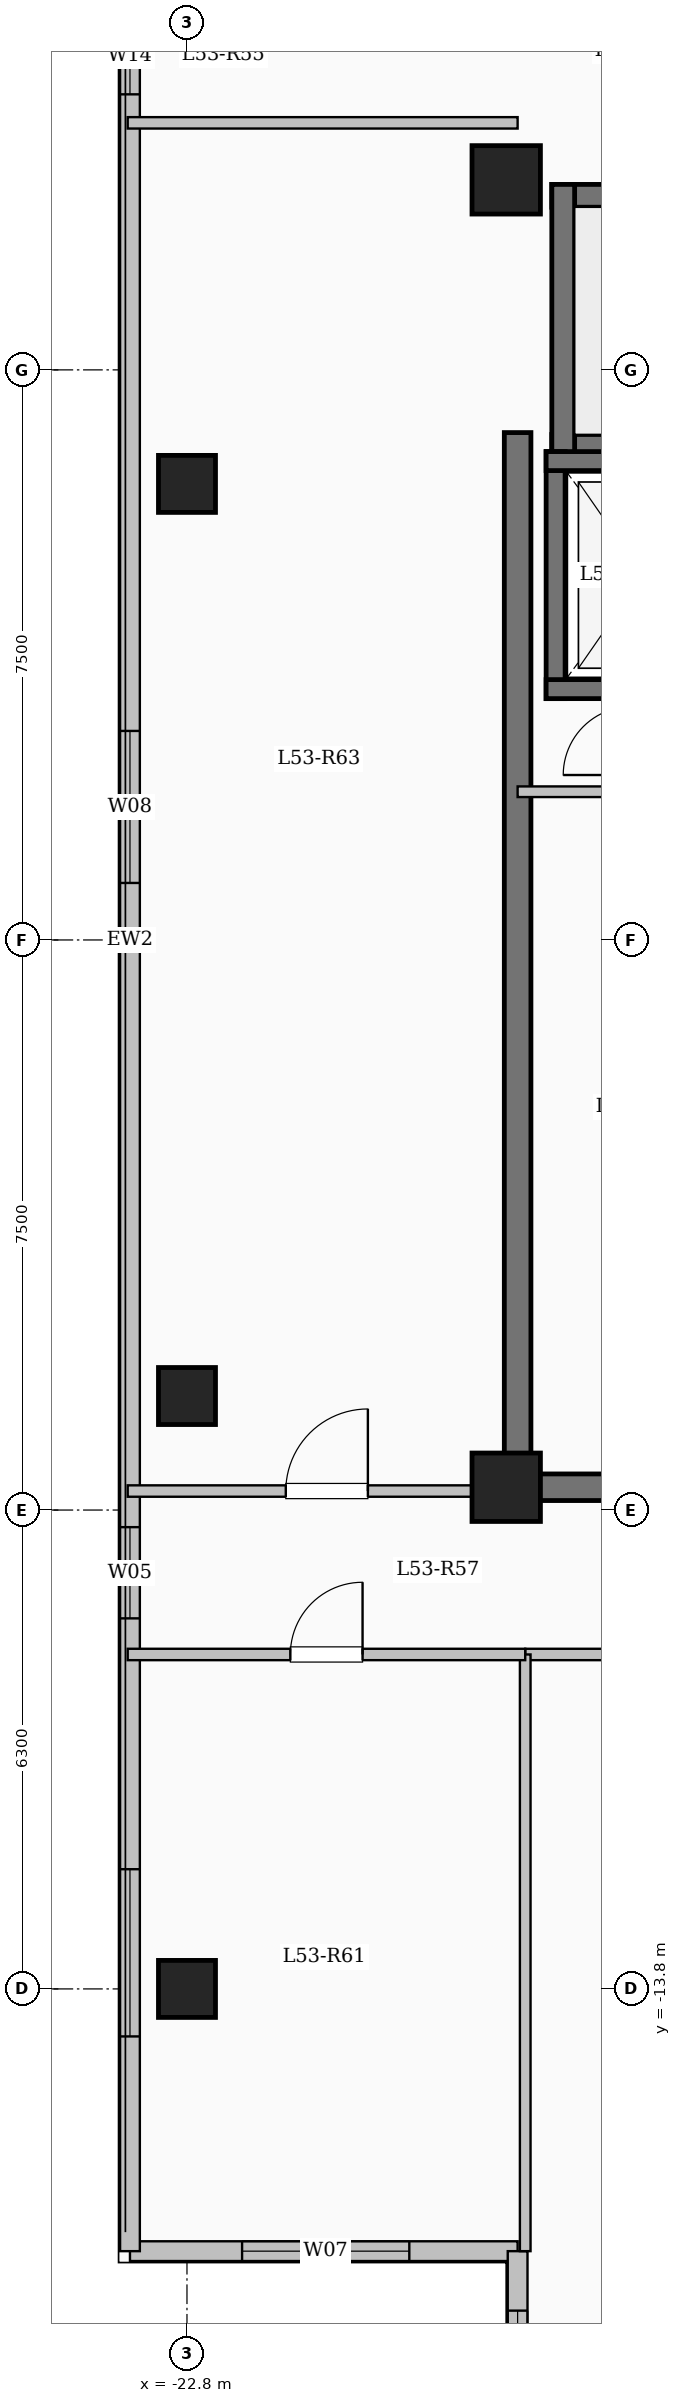
"""IFC4 building model, lengths in metres.
Left out: names, types, materials, properties, quantities, classifications, styles, units other than length and angle.
Written with IfcOpenShell. Run it as: python <this file> out.ifc"""

import sys

from ifc_helpers import new_model, si_unit, direction, frame, frame_2d, origin, origin_2d, place, context, subcontext, project, spatial, rectangle, extrude, element, fill, save


model = new_model("IFC4")
c1 = context("Model", 3, precision=1e-05, world=origin(), true_north=direction((0.0, 1.0)))
c2 = subcontext(c1, "Body", "Model", "MODEL_VIEW")
j1 = project(units=[si_unit("LENGTHUNIT", "METRE"), si_unit("PLANEANGLEUNIT", "RADIAN")], contexts=[c1])
p1 = place(None, origin())
s1 = spatial("IfcSite", under=j1, at=p1, CompositionType="ELEMENT")
p2 = place(p1, origin())
s2 = spatial("IfcBuilding", under=s1, at=p2, CompositionType="ELEMENT")
p3 = place(p2, frame((0.0, 0.0, 196.95)))
s3 = spatial("IfcBuildingStorey", under=s2, at=p3, CompositionType="ELEMENT", Elevation=196.95)
for number, where, z_axis, x_axis in (
    (1, (-18.6, -7.2, 0.0), (0.0, 0.0, 1.0), (1.0, 0.0, 0.0)),
    (2, (-18.6, 10.0, 0.0), (0.0, 0.0, 1.0), (1.0, 0.0, 0.0)),
):
    element("IfcColumn", number, at=place(p3, frame(where, z_axis=z_axis, x_axis=x_axis)), inside=s3, PredefinedType="COLUMN", context=c2, shape_type="SweptSolid", body=[
        extrude(rectangle(XDim=0.9, YDim=0.9, at=origin_2d()), origin(), (0.0, 0.0, 1.0), 3.35),
    ])
for number, where, z_axis, x_axis in (
    (3, (-22.8, -13.8, 0.0), (0.0, 0.0, 1.0), (1.0, 0.0, 0.0)),
    (4, (-22.8, -6.0, 0.0), (0.0, 0.0, 1.0), (1.0, 0.0, 0.0)),
    (5, (-22.8, 6.0, 0.0), (0.0, 0.0, 1.0), (1.0, 0.0, 0.0)),
):
    element("IfcColumn", number, at=place(p3, frame(where, z_axis=z_axis, x_axis=x_axis)), inside=s3, PredefinedType="COLUMN", context=c2, shape_type="SweptSolid", body=[
        extrude(rectangle(XDim=0.75, YDim=0.75, at=origin_2d()), origin(), (0.0, 0.0, 1.0), 3.35),
    ])
p4 = place(p3, frame((-18.45, -17.25, 0.0), z_axis=(0.0, 0.0, 1.0), x_axis=(-1.0, 0.0, 0.0)))
e6 = element("IfcWall", 6, at=p4, inside=s3, PredefinedType="SOLIDWALL", context=c2, shape_type="SweptSolid", body=[
    extrude(rectangle(XDim=5.1, YDim=0.26, at=frame_2d((2.55, 0.0))), origin(), (0.0, 0.0, 1.0), 3.1),
])
p5 = place(p4, frame((1.425, 0.0, 0.9)))
e7 = element("IfcOpeningElement", 7, at=p5, cuts=e6, PredefinedType="OPENING", context=c2, shape_type="SweptSolid", body=[
    extrude(rectangle(XDim=2.2, YDim=1.75, at=frame_2d((1.1, 0.875))), frame((0.0, 0.14, 0.0), z_axis=(0.0, -1.0, 0.0), x_axis=(1.0, 0.0, 0.0)), (0.0, 0.0, 1.0), 0.28),
])
p6 = place(p3, frame((-23.55, -17.25, 0.0), z_axis=(0.0, 0.0, 1.0), x_axis=(0.0, 1.0, 0.0)))
e8 = element("IfcWall", 8, at=p6, inside=s3, PredefinedType="SOLIDWALL", context=c2, shape_type="SweptSolid", body=[
    extrude(rectangle(XDim=34.5, YDim=0.26, at=frame_2d((17.25, 0.0))), origin(), (0.0, 0.0, 1.0), 3.1),
])
p7 = place(p6, frame((2.825, 0.0, 0.9)))
e9 = element("IfcOpeningElement", 9, at=p7, cuts=e8, PredefinedType="OPENING", context=c2, shape_type="SweptSolid", body=[
    extrude(rectangle(XDim=2.2, YDim=1.75, at=frame_2d((1.1, 0.875))), frame((0.0, 0.14, 0.0), z_axis=(0.0, -1.0, 0.0), x_axis=(1.0, 0.0, 0.0)), (0.0, 0.0, 1.0), 0.28),
])
p8 = place(p6, frame((8.325, 0.0, 0.95)))
e10 = element("IfcOpeningElement", 10, at=p8, cuts=e8, PredefinedType="OPENING", context=c2, shape_type="SweptSolid", body=[
    extrude(rectangle(XDim=1.2, YDim=1.5, at=frame_2d((0.6, 0.75))), frame((0.0, 0.14, 0.0), z_axis=(0.0, -1.0, 0.0), x_axis=(1.0, 0.0, 0.0)), (0.0, 0.0, 1.0), 0.28),
])
p9 = place(p6, frame((18.0, 0.0, 0.9)))
e11 = element("IfcOpeningElement", 11, at=p9, cuts=e8, PredefinedType="OPENING", context=c2, shape_type="SweptSolid", body=[
    extrude(rectangle(XDim=2.0, YDim=1.7, at=frame_2d((1.0, 0.85))), frame((0.0, 0.14, 0.0), z_axis=(0.0, -1.0, 0.0), x_axis=(1.0, 0.0, 0.0)), (0.0, 0.0, 1.0), 0.28),
])
p10 = place(p6, frame((28.375, 0.0, 0.95)))
e12 = element("IfcOpeningElement", 12, at=p10, cuts=e8, PredefinedType="OPENING", context=c2, shape_type="SweptSolid", body=[
    extrude(rectangle(XDim=1.0, YDim=1.5, at=frame_2d((0.5, 0.75))), frame((0.0, 0.14, 0.0), z_axis=(0.0, -1.0, 0.0), x_axis=(1.0, 0.0, 0.0)), (0.0, 0.0, 1.0), 0.28),
])
p11 = place(p6, frame((31.125, 0.0, 0.9)))
e13 = element("IfcOpeningElement", 13, at=p11, cuts=e8, PredefinedType="OPENING", context=c2, shape_type="SweptSolid", body=[
    extrude(rectangle(XDim=2.0, YDim=1.7, at=frame_2d((1.0, 0.85))), frame((0.0, 0.14, 0.0), z_axis=(0.0, -1.0, 0.0), x_axis=(1.0, 0.0, 0.0)), (0.0, 0.0, 1.0), 0.28),
])
p12 = place(p3, frame((-18.45, -20.85, 0.0), z_axis=(0.0, 0.0, 1.0), x_axis=(0.0, 1.0, 0.0)))
e14 = element("IfcWall", 14, at=p12, inside=s3, PredefinedType="SOLIDWALL", context=c2, shape_type="SweptSolid", body=[
    extrude(rectangle(XDim=3.6, YDim=0.26, at=frame_2d((1.8, 0.0))), origin(), (0.0, 0.0, 1.0), 3.1),
])
p13 = place(p12, frame((0.817, 0.0, 0.9)))
e15 = element("IfcOpeningElement", 15, at=p13, cuts=e14, PredefinedType="OPENING", context=c2, shape_type="SweptSolid", body=[
    extrude(rectangle(XDim=2.0, YDim=1.7, at=frame_2d((1.0, 0.85))), frame((0.0, 0.14, 0.0), z_axis=(0.0, -1.0, 0.0), x_axis=(1.0, 0.0, 0.0)), (0.0, 0.0, 1.0), 0.28),
])
p14 = place(p3, frame((-18.0, 9.79, 0.0), z_axis=(0.0, 0.0, 1.0), x_axis=(1.0, 0.0, 0.0)))
e16 = element("IfcWall", 16, at=p14, inside=s3, PredefinedType="SHEAR", context=c2, shape_type="SweptSolid", body=[
    extrude(rectangle(XDim=8.0, YDim=0.3, at=frame_2d((4.0, 0.0))), origin(), (0.0, 0.0, 1.0), 3.35),
])
p15 = place(p3, frame((-18.0, 6.5, 0.0), z_axis=(0.0, 0.0, 1.0), x_axis=(1.0, 0.0, 0.0)))
e17 = element("IfcWall", 17, at=p15, inside=s3, PredefinedType="SHEAR", context=c2, shape_type="SweptSolid", body=[
    extrude(rectangle(XDim=8.0, YDim=0.3, at=frame_2d((4.0, 0.0))), origin(), (0.0, 0.0, 1.0), 3.35),
])
p16 = place(p15, frame((6.45, 0.0, 0.0)))
e18 = element("IfcOpeningElement", 18, at=p16, cuts=e17, PredefinedType="OPENING", context=c2, shape_type="SweptSolid", body=[
    extrude(rectangle(XDim=1.0, YDim=2.15, at=frame_2d((0.5, 1.075))), frame((0.0, 0.16, 0.0), z_axis=(0.0, -1.0, 0.0), x_axis=(1.0, 0.0, 0.0)), (0.0, 0.0, 1.0), 0.32),
])
p17 = place(p3, frame((-17.85, 6.35, 0.0), z_axis=(0.0, 0.0, 1.0), x_axis=(0.0, 1.0, 0.0)))
e19 = element("IfcWall", 19, at=p17, inside=s3, PredefinedType="SHEAR", context=c2, shape_type="SweptSolid", body=[
    extrude(rectangle(XDim=3.59, YDim=0.3, at=frame_2d((1.795, 0.0))), origin(), (0.0, 0.0, 1.0), 3.35),
])
p18 = place(p3, frame((-17.95, 3.175, 0.0), z_axis=(0.0, 0.0, 1.0), x_axis=(0.0, 1.0, 0.0)))
e20 = element("IfcWall", 20, at=p18, inside=s3, PredefinedType="SHEAR", context=c2, shape_type="SweptSolid", body=[
    extrude(rectangle(XDim=3.25, YDim=0.25, at=frame_2d((1.625, 0.0))), origin(), (0.0, 0.0, 1.0), 3.35),
])
for number, where, z_axis, x_axis in (
    (21, (-18.075, 3.3, 0.0), (0.0, 0.0, 1.0), (1.0, 0.0, 0.0)),
    (22, (-18.075, 6.3, 0.0), (0.0, 0.0, 1.0), (1.0, 0.0, 0.0)),
):
    element("IfcWall", number, at=place(p3, frame(where, z_axis=z_axis, x_axis=x_axis)), inside=s3, PredefinedType="SHEAR", context=c2, shape_type="SweptSolid", body=[
        extrude(rectangle(XDim=2.55, YDim=0.25, at=frame_2d((1.275, 0.0))), origin(), (0.0, 0.0, 1.0), 3.35),
    ])
p19 = place(p3, frame((-18.45, -7.375, 0.0), z_axis=(0.0, 0.0, 1.0), x_axis=(0.0, 1.0, 0.0)))
e23 = element("IfcWall", 23, at=p19, inside=s3, PredefinedType="SHEAR", context=c2, shape_type="SweptSolid", body=[
    extrude(rectangle(XDim=14.05, YDim=0.35, at=frame_2d((7.025, 0.0))), origin(), (0.0, 0.0, 1.0), 3.35),
])
p20 = place(p3, frame((-18.625, -7.2, 0.0), z_axis=(0.0, 0.0, 1.0), x_axis=(1.0, 0.0, 0.0)))
e24 = element("IfcWall", 24, at=p20, inside=s3, PredefinedType="SHEAR", context=c2, shape_type="SweptSolid", body=[
    extrude(rectangle(XDim=8.55, YDim=0.35, at=frame_2d((4.275, 0.0))), origin(), (0.0, 0.0, 1.0), 3.35),
])
p21 = place(p20, frame((1.725, 0.0, 0.0)))
e25 = element("IfcOpeningElement", 25, at=p21, cuts=e24, PredefinedType="OPENING", context=c2, shape_type="SweptSolid", body=[
    extrude(rectangle(XDim=1.12, YDim=2.15, at=frame_2d((0.56, 1.075))), frame((0.0, 0.185, 0.0), z_axis=(0.0, -1.0, 0.0), x_axis=(1.0, 0.0, 0.0)), (0.0, 0.0, 1.0), 0.37),
])
p22 = place(p3, frame((-18.45, 1.95, 0.0), z_axis=(0.0, 0.0, 1.0), x_axis=(1.0, 0.0, 0.0)))
e26 = element("IfcWall", 26, at=p22, inside=s3, PredefinedType="PARTITIONING", context=c2, shape_type="SweptSolid", body=[
    extrude(rectangle(XDim=3.15, YDim=0.14, at=frame_2d((1.575, 0.0))), origin(), (0.0, 0.0, 1.0), 3.1),
])
p23 = place(p22, frame((1.9, 0.0, 0.0)))
e27 = element("IfcOpeningElement", 27, at=p23, cuts=e26, PredefinedType="OPENING", context=c2, shape_type="SweptSolid", body=[
    extrude(rectangle(XDim=0.9, YDim=2.08, at=frame_2d((0.45, 1.04))), frame((0.0, 0.08, 0.0), z_axis=(0.0, -1.0, 0.0), x_axis=(1.0, 0.0, 0.0)), (0.0, 0.0, 1.0), 0.16),
])
p24 = place(p3, frame((-18.35, -9.4, 0.0), z_axis=(0.0, 0.0, 1.0), x_axis=(1.0, 0.0, 0.0)))
e28 = element("IfcWall", 28, at=p24, inside=s3, PredefinedType="PARTITIONING", context=c2, shape_type="SweptSolid", body=[
    extrude(rectangle(XDim=9.8, YDim=0.15, at=frame_2d((4.9, 0.0))), origin(), (0.0, 0.0, 1.0), 3.1),
])
p25 = place(p24, frame((1.25, 0.0, 0.0)))
e29 = element("IfcOpeningElement", 29, at=p25, cuts=e28, PredefinedType="OPENING", context=c2, shape_type="SweptSolid", body=[
    extrude(rectangle(XDim=0.95, YDim=2.15, at=frame_2d((0.475, 1.075))), frame((0.0, 0.085, 0.0), z_axis=(0.0, -1.0, 0.0), x_axis=(1.0, 0.0, 0.0)), (0.0, 0.0, 1.0), 0.17),
])
p26 = place(p24, frame((4.79, 0.0, 0.0)))
e30 = element("IfcOpeningElement", 30, at=p26, cuts=e28, PredefinedType="OPENING", context=c2, shape_type="SweptSolid", body=[
    extrude(rectangle(XDim=0.95, YDim=2.15, at=frame_2d((0.475, 1.075))), frame((0.0, 0.085, 0.0), z_axis=(0.0, -1.0, 0.0), x_axis=(1.0, 0.0, 0.0)), (0.0, 0.0, 1.0), 0.17),
])
p27 = place(p24, frame((7.94, 0.0, 0.0)))
e31 = element("IfcOpeningElement", 31, at=p27, cuts=e28, PredefinedType="OPENING", context=c2, shape_type="SweptSolid", body=[
    extrude(rectangle(XDim=0.95, YDim=2.15, at=frame_2d((0.475, 1.075))), frame((0.0, 0.085, 0.0), z_axis=(0.0, -1.0, 0.0), x_axis=(1.0, 0.0, 0.0)), (0.0, 0.0, 1.0), 0.17),
])
p28 = place(p3, frame((-23.58, -7.25, 0.0), z_axis=(0.0, 0.0, 1.0), x_axis=(1.0, 0.0, 0.0)))
e32 = element("IfcWall", 32, at=p28, inside=s3, PredefinedType="PARTITIONING", context=c2, shape_type="SweptSolid", body=[
    extrude(rectangle(XDim=5.13, YDim=0.15, at=frame_2d((2.565, 0.0))), origin(), (0.0, 0.0, 1.0), 3.1),
])
p29 = place(p28, frame((2.08, 0.0, 0.0)))
e33 = element("IfcOpeningElement", 33, at=p29, cuts=e32, PredefinedType="OPENING", context=c2, shape_type="SweptSolid", body=[
    extrude(rectangle(XDim=1.08, YDim=2.15, at=frame_2d((0.54, 1.075))), frame((0.0, 0.085, 0.0), z_axis=(0.0, -1.0, 0.0), x_axis=(1.0, 0.0, 0.0)), (0.0, 0.0, 1.0), 0.17),
])
p30 = place(p3, frame((-23.58, 10.75, 0.0), z_axis=(0.0, 0.0, 1.0), x_axis=(1.0, 0.0, 0.0)))
e34 = element("IfcWall", 34, at=p30, inside=s3, PredefinedType="PARTITIONING", context=c2, shape_type="SweptSolid", body=[
    extrude(rectangle(XDim=5.13, YDim=0.15, at=frame_2d((2.565, 0.0))), origin(), (0.0, 0.0, 1.0), 3.1),
])
p31 = place(p3, frame((-18.35, -17.25, 0.0), z_axis=(0.0, 0.0, 1.0), x_axis=(0.0, 1.0, 0.0)))
e35 = element("IfcWall", 35, at=p31, inside=s3, PredefinedType="PARTITIONING", context=c2, shape_type="SweptSolid", body=[
    extrude(rectangle(XDim=7.85, YDim=0.14, at=frame_2d((3.925, 0.0))), origin(), (0.0, 0.0, 1.0), 3.1),
])
p32 = place(p3, frame((-23.58, -9.4, 0.0), z_axis=(0.0, 0.0, 1.0), x_axis=(1.0, 0.0, 0.0)))
e36 = element("IfcWall", 36, at=p32, inside=s3, PredefinedType="PARTITIONING", context=c2, shape_type="SweptSolid", body=[
    extrude(rectangle(XDim=5.23, YDim=0.15, at=frame_2d((2.615, 0.0))), origin(), (0.0, 0.0, 1.0), 3.1),
])
p33 = place(p32, frame((2.14, 0.0, 0.0)))
e37 = element("IfcOpeningElement", 37, at=p33, cuts=e36, PredefinedType="OPENING", context=c2, shape_type="SweptSolid", body=[
    extrude(rectangle(XDim=0.95, YDim=2.15, at=frame_2d((0.475, 1.075))), frame((0.0, 0.085, 0.0), z_axis=(0.0, -1.0, 0.0), x_axis=(1.0, 0.0, 0.0)), (0.0, 0.0, 1.0), 0.17),
])
p34 = place(p5, origin())
e38 = element("IfcWindow", 38, at=p34, inside=s3, PartitioningType="SINGLE_PANEL", PredefinedType="WINDOW", context=c2, shape_type="SweptSolid", body=[
    extrude(rectangle(XDim=2.2, YDim=1.75, at=frame_2d((1.1, 0.875))), frame((0.0, 0.03, 0.0), z_axis=(0.0, -1.0, 0.0), x_axis=(1.0, 0.0, 0.0)), (0.0, 0.0, 1.0), 0.06),
])
fill(e7, e38)
p35 = place(p7, origin())
e39 = element("IfcWindow", 39, at=p35, inside=s3, PartitioningType="SINGLE_PANEL", PredefinedType="WINDOW", context=c2, shape_type="SweptSolid", body=[
    extrude(rectangle(XDim=2.2, YDim=1.75, at=frame_2d((1.1, 0.875))), frame((0.0, 0.03, 0.0), z_axis=(0.0, -1.0, 0.0), x_axis=(1.0, 0.0, 0.0)), (0.0, 0.0, 1.0), 0.06),
])
fill(e9, e39)
p36 = place(p8, origin())
e40 = element("IfcWindow", 40, at=p36, inside=s3, PartitioningType="SINGLE_PANEL", PredefinedType="WINDOW", context=c2, shape_type="SweptSolid", body=[
    extrude(rectangle(XDim=1.2, YDim=1.5, at=frame_2d((0.6, 0.75))), frame((0.0, 0.03, 0.0), z_axis=(0.0, -1.0, 0.0), x_axis=(1.0, 0.0, 0.0)), (0.0, 0.0, 1.0), 0.06),
])
fill(e10, e40)
p37 = place(p9, origin())
e41 = element("IfcWindow", 41, at=p37, inside=s3, PartitioningType="SINGLE_PANEL", PredefinedType="WINDOW", context=c2, shape_type="SweptSolid", body=[
    extrude(rectangle(XDim=2.0, YDim=1.7, at=frame_2d((1.0, 0.85))), frame((0.0, 0.03, 0.0), z_axis=(0.0, -1.0, 0.0), x_axis=(1.0, 0.0, 0.0)), (0.0, 0.0, 1.0), 0.06),
])
fill(e11, e41)
p38 = place(p10, origin())
e42 = element("IfcWindow", 42, at=p38, inside=s3, PartitioningType="SINGLE_PANEL", PredefinedType="WINDOW", context=c2, shape_type="SweptSolid", body=[
    extrude(rectangle(XDim=1.0, YDim=1.5, at=frame_2d((0.5, 0.75))), frame((0.0, 0.03, 0.0), z_axis=(0.0, -1.0, 0.0), x_axis=(1.0, 0.0, 0.0)), (0.0, 0.0, 1.0), 0.06),
])
fill(e12, e42)
p39 = place(p13, origin())
e43 = element("IfcWindow", 43, at=p39, inside=s3, PartitioningType="SINGLE_PANEL", PredefinedType="WINDOW", context=c2, shape_type="SweptSolid", body=[
    extrude(rectangle(XDim=2.0, YDim=1.7, at=frame_2d((1.0, 0.85))), frame((0.0, 0.03, 0.0), z_axis=(0.0, -1.0, 0.0), x_axis=(1.0, 0.0, 0.0)), (0.0, 0.0, 1.0), 0.06),
])
fill(e15, e43)
p40 = place(p33, origin())
e44 = element("IfcDoor", 44, at=p40, inside=s3, OperationType="SINGLE_SWING_RIGHT", PredefinedType="DOOR", context=c2, shape_type="SweptSolid", body=[
    extrude(rectangle(XDim=0.95, YDim=2.15, at=frame_2d((0.475, 1.075))), frame((0.0, 0.025, 0.0), z_axis=(0.0, -1.0, 0.0), x_axis=(1.0, 0.0, 0.0)), (0.0, 0.0, 1.0), 0.05),
])
fill(e37, e44)
p41 = place(p29, origin())
e45 = element("IfcDoor", 45, at=p41, inside=s3, OperationType="SINGLE_SWING_RIGHT", PredefinedType="DOOR", context=c2, shape_type="SweptSolid", body=[
    extrude(rectangle(XDim=1.08, YDim=2.15, at=frame_2d((0.54, 1.075))), frame((0.0, 0.025, 0.0), z_axis=(0.0, -1.0, 0.0), x_axis=(1.0, 0.0, 0.0)), (0.0, 0.0, 1.0), 0.05),
])
fill(e33, e45)
save(model, sys.argv[1])
